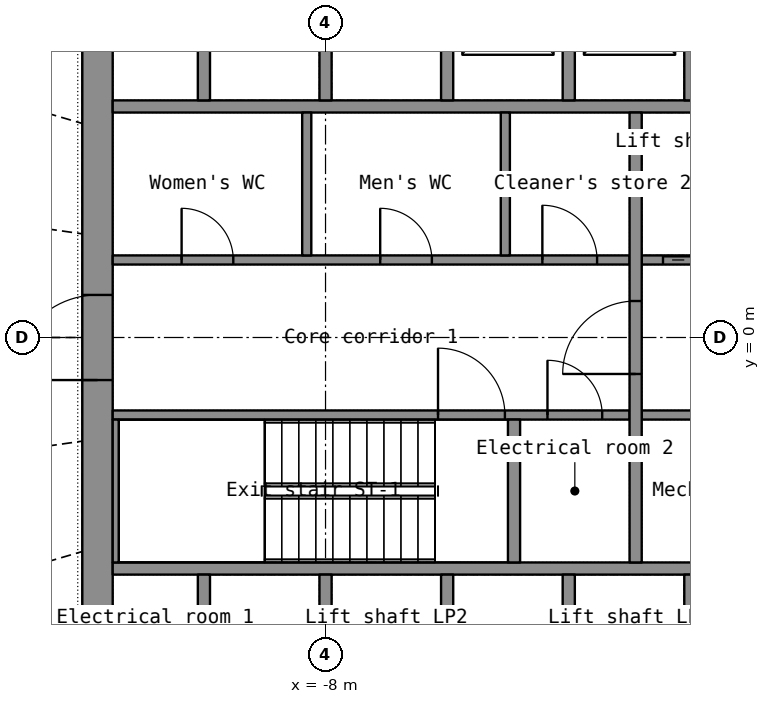
"""IFC4 building model, lengths in metres.
Left out: names, types, materials, properties, quantities, classifications, styles, units other than length and angle.
Written with IfcOpenShell. Run it as: python <this file> out.ifc"""

import sys

from ifc_helpers import new_model, si_unit, direction, frame, frame_2d, origin, place, context, subcontext, project, spatial, rectangle, extrude, element, fill, save


model = new_model("IFC4")
c1 = context("Model", 3, precision=1e-05, world=origin(), true_north=direction((0.0, 1.0)))
c2 = subcontext(c1, "Body", "Model", "MODEL_VIEW")
j1 = project(units=[si_unit("LENGTHUNIT", "METRE"), si_unit("PLANEANGLEUNIT", "RADIAN")], contexts=[c1])
p1 = place(None, origin())
s1 = spatial("IfcSite", under=j1, at=p1, CompositionType="ELEMENT")
p2 = place(p1, origin())
s2 = spatial("IfcBuilding", under=s1, at=p2, CompositionType="ELEMENT")
p3 = place(p2, frame((0.0, 0.0, 145.2)))
s3 = spatial("IfcBuildingStorey", under=s2, at=p3, CompositionType="ELEMENT", Elevation=145.2)
p4 = place(p3, frame((-11.75, -7.2, 0.0), z_axis=(0.0, 0.0, 1.0), x_axis=(0.0, 1.0, 0.0)))
e1 = element("IfcWall", 1, at=p4, inside=s3, PredefinedType="SHEAR", context=c2, shape_type="SweptSolid", body=[
    extrude(rectangle(XDim=14.4, YDim=0.5, at=frame_2d((7.2, 0.0))), origin(), (0.0, 0.0, 1.0), 7.0),
])
p5 = place(p4, frame((6.5, 0.0, 0.0)))
e2 = element("IfcOpeningElement", 2, at=p5, cuts=e1, PredefinedType="OPENING", context=c2, shape_type="SweptSolid", body=[
    extrude(rectangle(XDim=1.4, YDim=2.2, at=frame_2d((0.7, 1.1))), frame((0.0, 0.26, 0.0), z_axis=(0.0, -1.0, 0.0), x_axis=(1.0, 0.0, 0.0)), (0.0, 0.0, 1.0), 0.52),
])
for number, where, z_axis, x_axis in (
    (3, (-11.5, -3.8, 0.0), (0.0, 0.0, 1.0), (1.0, 0.0, 0.0)),
    (4, (-11.5, 3.8, 0.0), (0.0, 0.0, 1.0), (1.0, 0.0, 0.0)),
):
    element("IfcWall", number, at=place(p3, frame(where, z_axis=z_axis, x_axis=x_axis)), inside=s3, PredefinedType="SHEAR", context=c2, shape_type="SweptSolid", body=[
        extrude(rectangle(XDim=23.0, YDim=0.2, at=frame_2d((11.5, 0.0))), origin(), (0.0, 0.0, 1.0), 7.0),
    ])
for number, where, z_axis, x_axis in (
    (5, (-10.0, -6.7, 0.0), (0.0, 0.0, 1.0), (0.0, 1.0, 0.0)),
    (6, (-8.0, -6.7, 0.0), (0.0, 0.0, 1.0), (0.0, 1.0, 0.0)),
    (7, (-6.0, -6.7, 0.0), (0.0, 0.0, 1.0), (0.0, 1.0, 0.0)),
    (8, (-4.0, -6.7, 0.0), (0.0, 0.0, 1.0), (0.0, 1.0, 0.0)),
    (9, (-2.0, -6.7, 0.0), (0.0, 0.0, 1.0), (0.0, 1.0, 0.0)),
    (10, (-10.0, 3.9, 0.0), (0.0, 0.0, 1.0), (0.0, 1.0, 0.0)),
    (11, (-8.0, 3.9, 0.0), (0.0, 0.0, 1.0), (0.0, 1.0, 0.0)),
    (12, (-6.0, 3.9, 0.0), (0.0, 0.0, 1.0), (0.0, 1.0, 0.0)),
    (13, (-4.0, 3.9, 0.0), (0.0, 0.0, 1.0), (0.0, 1.0, 0.0)),
    (14, (-2.0, 3.9, 0.0), (0.0, 0.0, 1.0), (0.0, 1.0, 0.0)),
):
    element("IfcWall", number, at=place(p3, frame(where, z_axis=z_axis, x_axis=x_axis)), inside=s3, PredefinedType="SHEAR", context=c2, shape_type="SweptSolid", body=[
        extrude(rectangle(XDim=2.8, YDim=0.2, at=frame_2d((1.4, 0.0))), origin(), (0.0, 0.0, 1.0), 7.0),
    ])
p6 = place(p3, frame((-11.5, -1.275, 0.0), z_axis=(0.0, 0.0, 1.0), x_axis=(1.0, 0.0, 0.0)))
e15 = element("IfcWall", 15, at=p6, inside=s3, PredefinedType="SHEAR", context=c2, shape_type="SweptSolid", body=[
    extrude(rectangle(XDim=8.5, YDim=0.15, at=frame_2d((4.25, 0.0))), origin(), (0.0, 0.0, 1.0), 7.0),
])
p7 = place(p6, frame((5.35, 0.0, 0.0)))
e16 = element("IfcOpeningElement", 16, at=p7, cuts=e15, PredefinedType="OPENING", context=c2, shape_type="SweptSolid", body=[
    extrude(rectangle(XDim=1.1, YDim=2.15, at=frame_2d((0.55, 1.075))), frame((0.0, 0.085, 0.0), z_axis=(0.0, -1.0, 0.0), x_axis=(1.0, 0.0, 0.0)), (0.0, 0.0, 1.0), 0.17),
])
p8 = place(p6, frame((7.15, 0.0, 0.0)))
e17 = element("IfcOpeningElement", 17, at=p8, cuts=e15, PredefinedType="OPENING", context=c2, shape_type="SweptSolid", body=[
    extrude(rectangle(XDim=0.9, YDim=2.1, at=frame_2d((0.45, 1.05))), frame((0.0, 0.085, 0.0), z_axis=(0.0, -1.0, 0.0), x_axis=(1.0, 0.0, 0.0)), (0.0, 0.0, 1.0), 0.17),
])
p9 = place(p3, frame((-2.8, -1.275, 0.0), z_axis=(0.0, 0.0, 1.0), x_axis=(1.0, 0.0, 0.0)))
e18 = element("IfcWall", 18, at=p9, inside=s3, PredefinedType="SHEAR", context=c2, shape_type="SweptSolid", body=[
    extrude(rectangle(XDim=5.6, YDim=0.15, at=frame_2d((2.8, 0.0))), origin(), (0.0, 0.0, 1.0), 7.0),
])
p10 = place(p9, frame((4.15, 0.0, 0.0)))
e19 = element("IfcOpeningElement", 19, at=p10, cuts=e18, PredefinedType="OPENING", context=c2, shape_type="SweptSolid", body=[
    extrude(rectangle(XDim=1.1, YDim=2.2, at=frame_2d((0.55, 1.1))), frame((0.0, 0.085, 0.0), z_axis=(0.0, -1.0, 0.0), x_axis=(1.0, 0.0, 0.0)), (0.0, 0.0, 1.0), 0.17),
])
p11 = place(p9, frame((1.35, 0.0, 0.0)))
e20 = element("IfcOpeningElement", 20, at=p11, cuts=e18, PredefinedType="OPENING", context=c2, shape_type="SweptSolid", body=[
    extrude(rectangle(XDim=0.9, YDim=2.1, at=frame_2d((0.45, 1.05))), frame((0.0, 0.085, 0.0), z_axis=(0.0, -1.0, 0.0), x_axis=(1.0, 0.0, 0.0)), (0.0, 0.0, 1.0), 0.17),
])
p12 = place(p3, frame((-11.5, 1.275, 0.0), z_axis=(0.0, 0.0, 1.0), x_axis=(1.0, 0.0, 0.0)))
e21 = element("IfcWall", 21, at=p12, inside=s3, PredefinedType="PARTITIONING", context=c2, shape_type="SweptSolid", body=[
    extrude(rectangle(XDim=8.5, YDim=0.15, at=frame_2d((4.25, 0.0))), origin(), (0.0, 0.0, 1.0), 7.0),
])
p13 = place(p12, frame((1.133, 0.0, 0.0)))
e22 = element("IfcOpeningElement", 22, at=p13, cuts=e21, PredefinedType="OPENING", context=c2, shape_type="SweptSolid", body=[
    extrude(rectangle(XDim=0.85, YDim=2.1, at=frame_2d((0.425, 1.05))), frame((0.0, 0.085, 0.0), z_axis=(0.0, -1.0, 0.0), x_axis=(1.0, 0.0, 0.0)), (0.0, 0.0, 1.0), 0.17),
])
p14 = place(p12, frame((4.399, 0.0, 0.0)))
e23 = element("IfcOpeningElement", 23, at=p14, cuts=e21, PredefinedType="OPENING", context=c2, shape_type="SweptSolid", body=[
    extrude(rectangle(XDim=0.85, YDim=2.1, at=frame_2d((0.425, 1.05))), frame((0.0, 0.085, 0.0), z_axis=(0.0, -1.0, 0.0), x_axis=(1.0, 0.0, 0.0)), (0.0, 0.0, 1.0), 0.17),
])
p15 = place(p12, frame((7.066, 0.0, 0.0)))
e24 = element("IfcOpeningElement", 24, at=p15, cuts=e21, PredefinedType="OPENING", context=c2, shape_type="SweptSolid", body=[
    extrude(rectangle(XDim=0.9, YDim=2.1, at=frame_2d((0.45, 1.05))), frame((0.0, 0.085, 0.0), z_axis=(0.0, -1.0, 0.0), x_axis=(1.0, 0.0, 0.0)), (0.0, 0.0, 1.0), 0.17),
])
p16 = place(p3, frame((-2.8, 1.275, 0.0), z_axis=(0.0, 0.0, 1.0), x_axis=(1.0, 0.0, 0.0)))
e25 = element("IfcWall", 25, at=p16, inside=s3, PredefinedType="SHEAR", context=c2, shape_type="SweptSolid", body=[
    extrude(rectangle(XDim=5.6, YDim=0.15, at=frame_2d((2.8, 0.0))), origin(), (0.0, 0.0, 1.0), 7.0),
])
p17 = place(p16, frame((0.35, 0.0, 0.0)))
e26 = element("IfcOpeningElement", 26, at=p17, cuts=e25, PredefinedType="OPENING", context=c2, shape_type="SweptSolid", body=[
    extrude(rectangle(XDim=1.1, YDim=2.2, at=frame_2d((0.55, 1.1))), frame((0.0, 0.085, 0.0), z_axis=(0.0, -1.0, 0.0), x_axis=(1.0, 0.0, 0.0)), (0.0, 0.0, 1.0), 0.17),
])
p18 = place(p16, frame((3.35, 0.0, 0.0)))
e27 = element("IfcOpeningElement", 27, at=p18, cuts=e25, PredefinedType="OPENING", context=c2, shape_type="SweptSolid", body=[
    extrude(rectangle(XDim=0.9, YDim=2.1, at=frame_2d((0.45, 1.05))), frame((0.0, 0.085, 0.0), z_axis=(0.0, -1.0, 0.0), x_axis=(1.0, 0.0, 0.0)), (0.0, 0.0, 1.0), 0.17),
])
p19 = place(p3, frame((-2.9, -3.7, 0.0), z_axis=(0.0, 0.0, 1.0), x_axis=(0.0, 1.0, 0.0)))
e28 = element("IfcWall", 28, at=p19, inside=s3, PredefinedType="SHEAR", context=c2, shape_type="SweptSolid", body=[
    extrude(rectangle(XDim=7.4, YDim=0.2, at=frame_2d((3.7, 0.0))), origin(), (0.0, 0.0, 1.0), 7.0),
])
p20 = place(p19, frame((3.1, 0.0, 0.0)))
e29 = element("IfcOpeningElement", 29, at=p20, cuts=e28, PredefinedType="OPENING", context=c2, shape_type="SweptSolid", body=[
    extrude(rectangle(XDim=1.2, YDim=2.2, at=frame_2d((0.6, 1.1))), frame((0.0, 0.11, 0.0), z_axis=(0.0, -1.0, 0.0), x_axis=(1.0, 0.0, 0.0)), (0.0, 0.0, 1.0), 0.22),
])
p21 = place(p3, frame((-11.45, -3.7, 0.0), z_axis=(0.0, 0.0, 1.0), x_axis=(0.0, 1.0, 0.0)))
e30 = element("IfcWall", 30, at=p21, inside=s3, PredefinedType="SHEAR", context=c2, shape_type="SweptSolid", body=[
    extrude(rectangle(XDim=2.35, YDim=0.1, at=frame_2d((1.175, 0.0))), origin(), (0.0, 0.0, 1.0), 7.0),
])
p22 = place(p3, frame((-4.9, -3.7, 0.0), z_axis=(0.0, 0.0, 1.0), x_axis=(0.0, 1.0, 0.0)))
e31 = element("IfcWall", 31, at=p22, inside=s3, PredefinedType="SHEAR", context=c2, shape_type="SweptSolid", body=[
    extrude(rectangle(XDim=2.35, YDim=0.2, at=frame_2d((1.175, 0.0))), origin(), (0.0, 0.0, 1.0), 7.0),
])
for number, where, z_axis, x_axis in (
    (32, (-8.309, 1.35, 0.0), (0.0, 0.0, 1.0), (0.0, 1.0, 0.0)),
    (33, (-5.043, 1.35, 0.0), (0.0, 0.0, 1.0), (0.0, 1.0, 0.0)),
):
    element("IfcWall", number, at=place(p3, frame(where, z_axis=z_axis, x_axis=x_axis)), inside=s3, PredefinedType="PARTITIONING", context=c2, shape_type="SweptSolid", body=[
        extrude(rectangle(XDim=2.35, YDim=0.15, at=frame_2d((1.175, 0.0))), origin(), (0.0, 0.0, 1.0), 7.0),
    ])
p23 = place(p5, origin())
e34 = element("IfcDoor", 34, at=p23, inside=s3, OperationType="DOUBLE_DOOR_SINGLE_SWING", PredefinedType="DOOR", context=c2, shape_type="SweptSolid", body=[
    extrude(rectangle(XDim=1.4, YDim=2.2, at=frame_2d((0.7, 1.1))), frame((0.0, 0.025, 0.0), z_axis=(0.0, -1.0, 0.0), x_axis=(1.0, 0.0, 0.0)), (0.0, 0.0, 1.0), 0.05),
])
fill(e2, e34)
p24 = place(p20, origin())
e35 = element("IfcDoor", 35, at=p24, inside=s3, OperationType="SINGLE_SWING_LEFT", PredefinedType="DOOR", context=c2, shape_type="SweptSolid", body=[
    extrude(rectangle(XDim=1.2, YDim=2.2, at=frame_2d((0.6, 1.1))), frame((0.0, 0.025, 0.0), z_axis=(0.0, -1.0, 0.0), x_axis=(1.0, 0.0, 0.0)), (0.0, 0.0, 1.0), 0.05),
])
fill(e29, e35)
p25 = place(p17, origin())
e36 = element("IfcDoor", 36, at=p25, inside=s3, OperationType="DOUBLE_DOOR_SLIDING", PredefinedType="DOOR", context=c2, shape_type="SweptSolid", body=[
    extrude(rectangle(XDim=1.1, YDim=2.2, at=frame_2d((0.55, 1.1))), frame((0.0, 0.025, 0.0), z_axis=(0.0, -1.0, 0.0), x_axis=(1.0, 0.0, 0.0)), (0.0, 0.0, 1.0), 0.05),
])
fill(e26, e36)
p26 = place(p7, origin())
e37 = element("IfcDoor", 37, at=p26, inside=s3, OperationType="SINGLE_SWING_LEFT", PredefinedType="DOOR", context=c2, shape_type="SweptSolid", body=[
    extrude(rectangle(XDim=1.1, YDim=2.15, at=frame_2d((0.55, 1.075))), frame((0.0, 0.025, 0.0), z_axis=(0.0, -1.0, 0.0), x_axis=(1.0, 0.0, 0.0)), (0.0, 0.0, 1.0), 0.05),
])
fill(e16, e37)
p27 = place(p13, origin())
e38 = element("IfcDoor", 38, at=p27, inside=s3, OperationType="SINGLE_SWING_LEFT", PredefinedType="DOOR", context=c2, shape_type="SweptSolid", body=[
    extrude(rectangle(XDim=0.85, YDim=2.1, at=frame_2d((0.425, 1.05))), frame((0.0, 0.025, 0.0), z_axis=(0.0, -1.0, 0.0), x_axis=(1.0, 0.0, 0.0)), (0.0, 0.0, 1.0), 0.05),
])
fill(e22, e38)
p28 = place(p14, origin())
e39 = element("IfcDoor", 39, at=p28, inside=s3, OperationType="SINGLE_SWING_LEFT", PredefinedType="DOOR", context=c2, shape_type="SweptSolid", body=[
    extrude(rectangle(XDim=0.85, YDim=2.1, at=frame_2d((0.425, 1.05))), frame((0.0, 0.025, 0.0), z_axis=(0.0, -1.0, 0.0), x_axis=(1.0, 0.0, 0.0)), (0.0, 0.0, 1.0), 0.05),
])
fill(e23, e39)
p29 = place(p15, origin())
e40 = element("IfcDoor", 40, at=p29, inside=s3, OperationType="SINGLE_SWING_LEFT", PredefinedType="DOOR", context=c2, shape_type="SweptSolid", body=[
    extrude(rectangle(XDim=0.9, YDim=2.1, at=frame_2d((0.45, 1.05))), frame((0.0, 0.025, 0.0), z_axis=(0.0, -1.0, 0.0), x_axis=(1.0, 0.0, 0.0)), (0.0, 0.0, 1.0), 0.05),
])
fill(e24, e40)
p30 = place(p8, origin())
e41 = element("IfcDoor", 41, at=p30, inside=s3, OperationType="SINGLE_SWING_LEFT", PredefinedType="DOOR", context=c2, shape_type="SweptSolid", body=[
    extrude(rectangle(XDim=0.9, YDim=2.1, at=frame_2d((0.45, 1.05))), frame((0.0, 0.025, 0.0), z_axis=(0.0, -1.0, 0.0), x_axis=(1.0, 0.0, 0.0)), (0.0, 0.0, 1.0), 0.05),
])
fill(e17, e41)
save(model, sys.argv[1])
